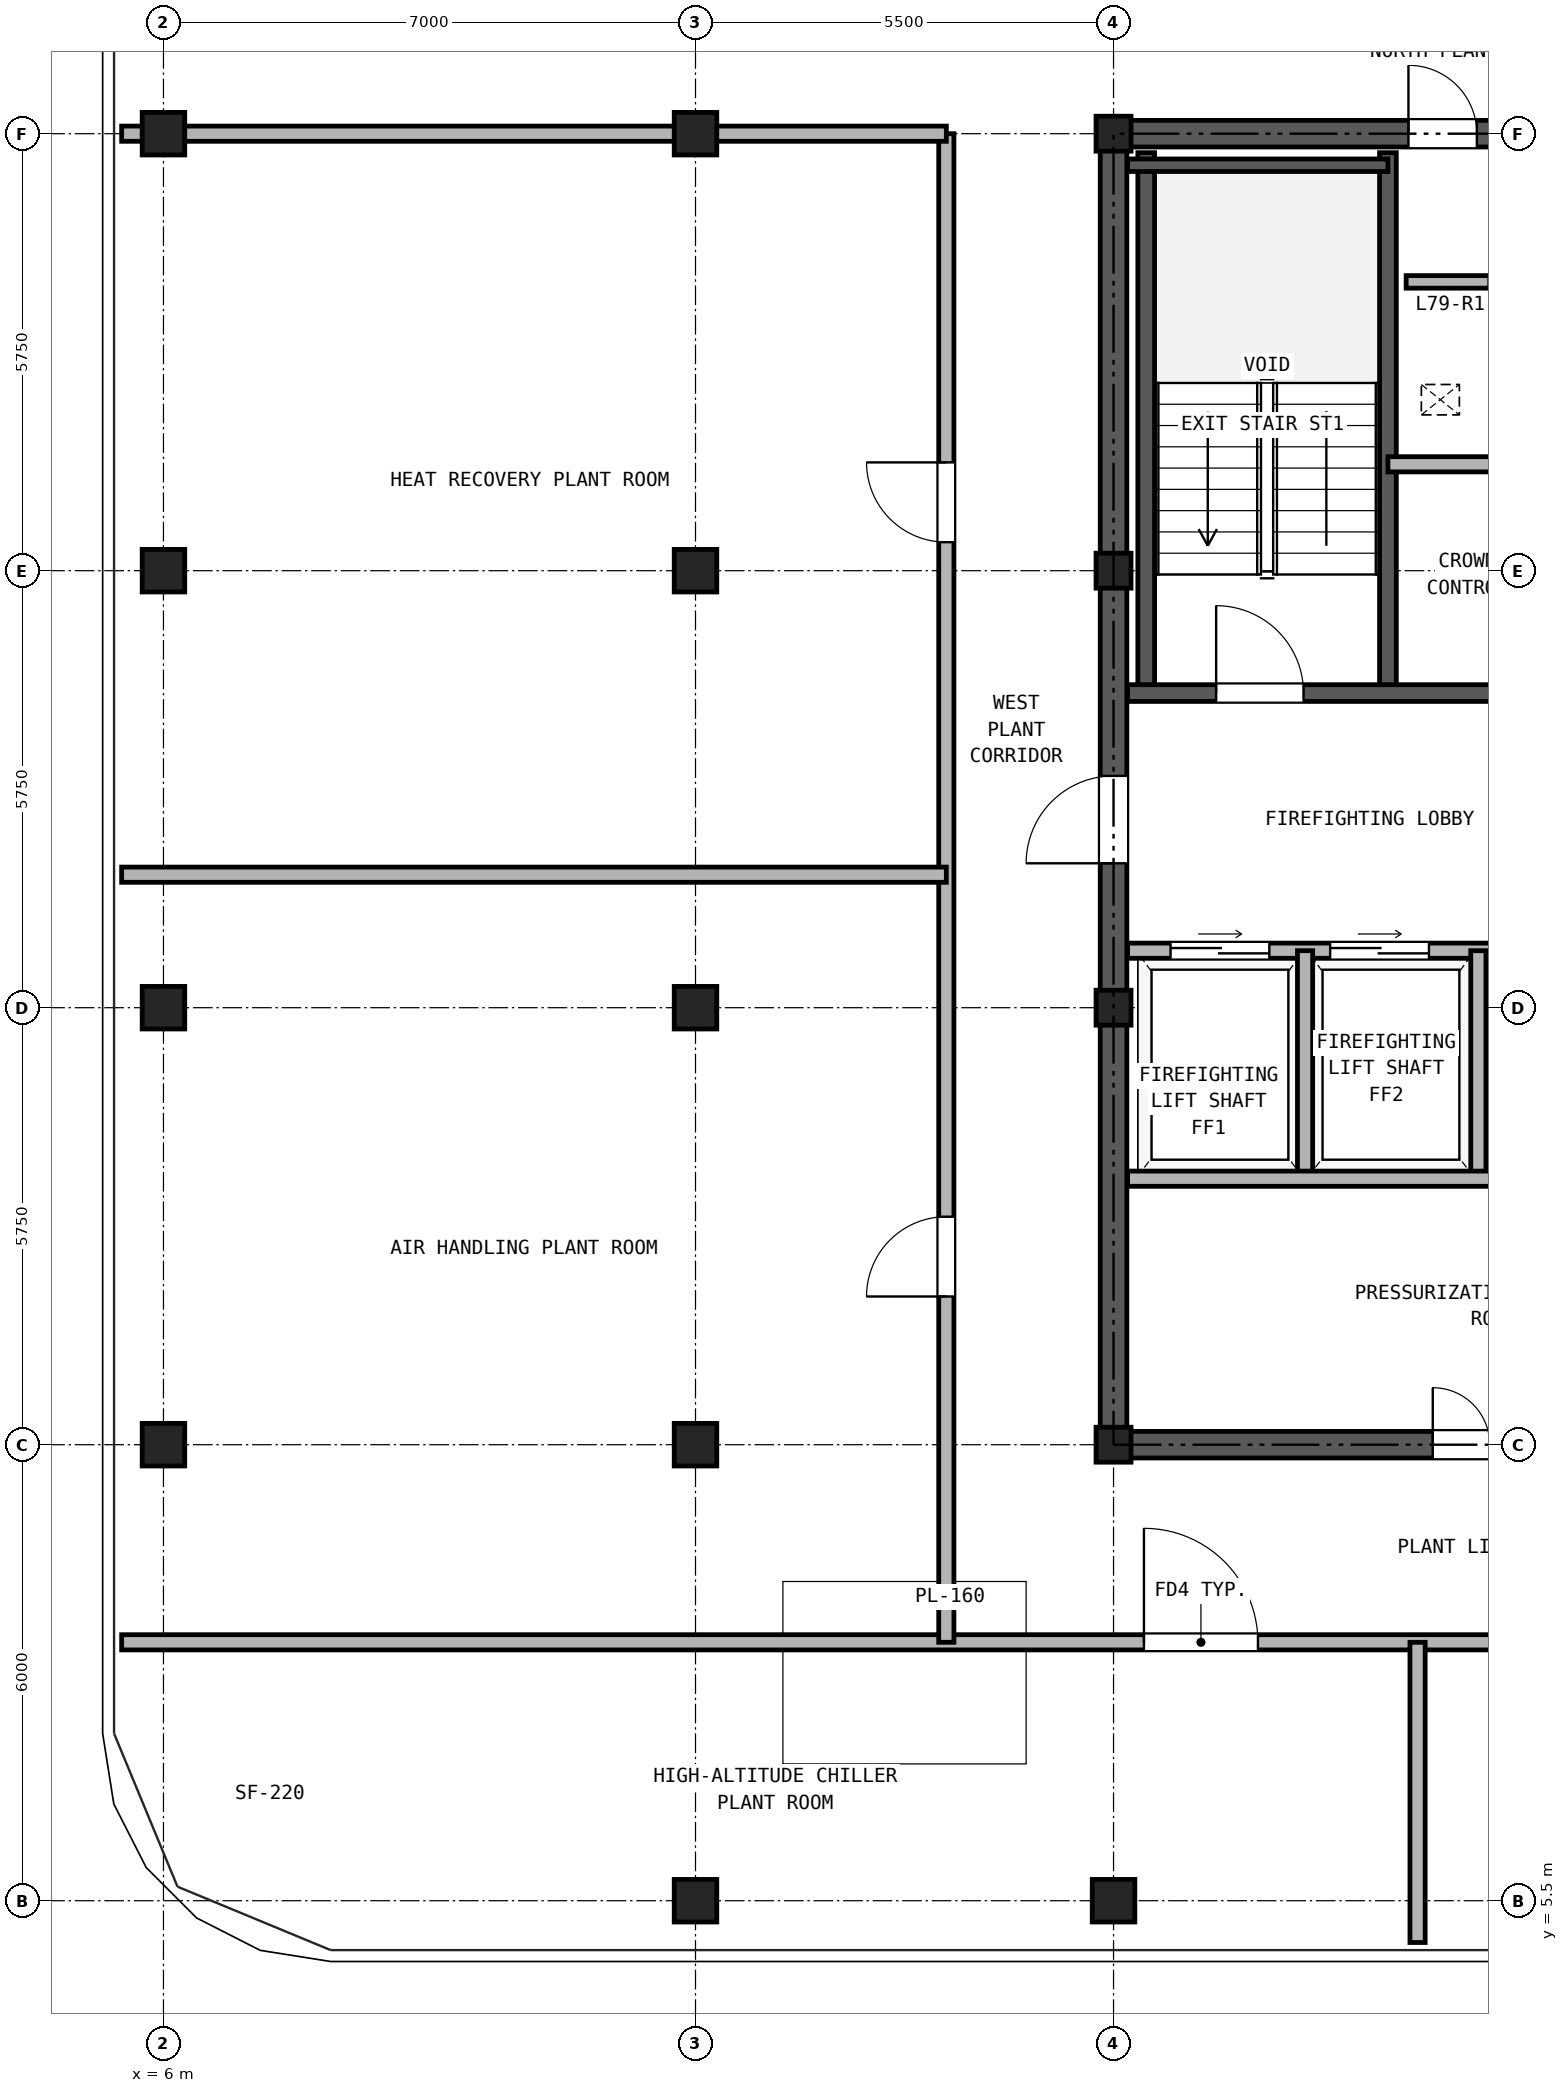
"""IFC4 building model, lengths in metres.
Left out: names, types, materials, properties, quantities, classifications, styles, units other than length and angle.
Written with IfcOpenShell. Run it as: python <this file> out.ifc"""

import sys

from ifc_helpers import new_model, si_unit, direction, frame, frame_2d, origin, origin_2d, place, context, subcontext, project, spatial, rectangle, hollow_rectangle, extrude, source, transform, mapped, element, fill, save


model = new_model("IFC4")
c1 = context("Model", 3, precision=1e-05, world=origin(), true_north=direction((0.0, 1.0)))
c2 = subcontext(c1, "Body", "Model", "MODEL_VIEW")
j1 = project(units=[si_unit("LENGTHUNIT", "METRE"), si_unit("PLANEANGLEUNIT", "RADIAN")], contexts=[c1])
p1 = place(None, origin())
s1 = spatial("IfcSite", under=j1, at=p1, CompositionType="ELEMENT")
p2 = place(p1, origin())
s2 = spatial("IfcBuilding", under=s1, at=p2, CompositionType="ELEMENT")
p3 = place(p2, frame((0.0, 0.0, 274.9)))
s3 = spatial("IfcBuildingStorey", under=s2, at=p3, CompositionType="ELEMENT", Elevation=274.9)
m1 = source(origin(), c2, "Body", "SweptSolid", [
    extrude(hollow_rectangle(XDim=0.56, YDim=0.56, WallThickness=0.03, at=origin_2d()), origin(), (0.0, 0.0, 1.0), 3.38),
])
for number, where, z_axis, x_axis in (
    (1, (13.0, 5.5, 0.0), (0.0, 0.0, 1.0), (1.0, 0.0, 0.0)),
    (2, (18.5, 5.5, 0.0), (0.0, 0.0, 1.0), (1.0, 0.0, 0.0)),
    (3, (6.0, 11.5, 0.0), (0.0, 0.0, 1.0), (1.0, 0.0, 0.0)),
    (4, (6.0, 17.25, 0.0), (0.0, 0.0, 1.0), (1.0, 0.0, 0.0)),
    (5, (6.0, 23.0, 0.0), (0.0, 0.0, 1.0), (1.0, 0.0, 0.0)),
    (6, (6.0, 28.75, 0.0), (0.0, 0.0, 1.0), (1.0, 0.0, 0.0)),
    (7, (13.0, 11.5, 0.0), (0.0, 0.0, 1.0), (1.0, 0.0, 0.0)),
    (8, (13.0, 17.25, 0.0), (0.0, 0.0, 1.0), (1.0, 0.0, 0.0)),
    (9, (13.0, 23.0, 0.0), (0.0, 0.0, 1.0), (1.0, 0.0, 0.0)),
    (10, (13.0, 28.75, 0.0), (0.0, 0.0, 1.0), (1.0, 0.0, 0.0)),
):
    element("IfcColumn", number, at=place(p3, frame(where, z_axis=z_axis, x_axis=x_axis)), inside=s3, PredefinedType="COLUMN", context=c2, shape_type="MappedRepresentation", body=[
        mapped(m1, transform((0.0, 0.0, 0.0), x_axis=(1.0, 0.0, 0.0), y_axis=(0.0, 1.0, 0.0), z_axis=(0.0, 0.0, 1.0), scale=1.0)),
    ])
m2 = source(origin(), c2, "Body", "SweptSolid", [
    extrude(hollow_rectangle(XDim=0.46, YDim=0.46, WallThickness=0.025, at=origin_2d()), origin(), (0.0, 0.0, 1.0), 3.38),
])
for number, where, z_axis, x_axis in (
    (11, (18.5, 11.5, 0.0), (0.0, 0.0, 1.0), (1.0, 0.0, 0.0)),
    (12, (18.5, 17.25, 0.0), (0.0, 0.0, 1.0), (1.0, 0.0, 0.0)),
    (13, (18.5, 23.0, 0.0), (0.0, 0.0, 1.0), (1.0, 0.0, 0.0)),
    (14, (18.5, 28.75, 0.0), (0.0, 0.0, 1.0), (1.0, 0.0, 0.0)),
):
    element("IfcColumn", number, at=place(p3, frame(where, z_axis=z_axis, x_axis=x_axis)), inside=s3, PredefinedType="COLUMN", context=c2, shape_type="MappedRepresentation", body=[
        mapped(m2, transform((0.0, 0.0, 0.0), x_axis=(1.0, 0.0, 0.0), y_axis=(0.0, 1.0, 0.0), z_axis=(0.0, 0.0, 1.0), scale=1.0)),
    ])
p4 = place(p3, frame((18.325, 11.5, 0.0), z_axis=(0.0, 0.0, 1.0), x_axis=(1.0, 0.0, 0.0)))
e15 = element("IfcWall", 15, at=p4, inside=s3, PredefinedType="SHEAR", context=c2, shape_type="SweptSolid", body=[
    extrude(rectangle(XDim=10.35, YDim=0.35, at=frame_2d((5.175, 0.0))), origin(), (0.0, 0.0, 1.0), 3.38),
])
p5 = place(p4, frame((4.375, 0.0, 0.0)))
e16 = element("IfcOpeningElement", 16, at=p5, cuts=e15, PredefinedType="OPENING", context=c2, shape_type="SweptSolid", body=[
    extrude(rectangle(XDim=1.5, YDim=2.25, at=frame_2d((0.75, 1.125))), frame((0.0, 0.185, 0.0), z_axis=(0.0, -1.0, 0.0), x_axis=(1.0, 0.0, 0.0)), (0.0, 0.0, 1.0), 0.37),
])
p6 = place(p3, frame((18.325, 28.75, 0.0), z_axis=(0.0, 0.0, 1.0), x_axis=(1.0, 0.0, 0.0)))
e17 = element("IfcWall", 17, at=p6, inside=s3, PredefinedType="SHEAR", context=c2, shape_type="SweptSolid", body=[
    extrude(rectangle(XDim=10.35, YDim=0.35, at=frame_2d((5.175, 0.0))), origin(), (0.0, 0.0, 1.0), 3.38),
])
p7 = place(p6, frame((4.055, 0.0, 0.0)))
e18 = element("IfcOpeningElement", 18, at=p7, cuts=e17, PredefinedType="OPENING", context=c2, shape_type="SweptSolid", body=[
    extrude(rectangle(XDim=0.9, YDim=2.05, at=frame_2d((0.45, 1.025))), frame((0.0, 0.185, 0.0), z_axis=(0.0, -1.0, 0.0), x_axis=(1.0, 0.0, 0.0)), (0.0, 0.0, 1.0), 0.37),
])
p8 = place(p6, frame((5.595, 0.0, 0.0)))
e19 = element("IfcOpeningElement", 19, at=p8, cuts=e17, PredefinedType="OPENING", context=c2, shape_type="SweptSolid", body=[
    extrude(rectangle(XDim=0.9, YDim=2.05, at=frame_2d((0.45, 1.025))), frame((0.0, 0.185, 0.0), z_axis=(0.0, -1.0, 0.0), x_axis=(1.0, 0.0, 0.0)), (0.0, 0.0, 1.0), 0.37),
])
p9 = place(p3, frame((18.5, 11.675, 0.0), z_axis=(0.0, 0.0, 1.0), x_axis=(0.0, 1.0, 0.0)))
e20 = element("IfcWall", 20, at=p9, inside=s3, PredefinedType="SHEAR", context=c2, shape_type="SweptSolid", body=[
    extrude(rectangle(XDim=16.9, YDim=0.35, at=frame_2d((8.45, 0.0))), origin(), (0.0, 0.0, 1.0), 3.38),
])
p10 = place(p9, frame((7.475, 0.0, 0.0)))
e21 = element("IfcOpeningElement", 21, at=p10, cuts=e20, PredefinedType="OPENING", context=c2, shape_type="SweptSolid", body=[
    extrude(rectangle(XDim=1.15, YDim=2.2, at=frame_2d((0.575, 1.1))), frame((0.0, 0.185, 0.0), z_axis=(0.0, -1.0, 0.0), x_axis=(1.0, 0.0, 0.0)), (0.0, 0.0, 1.0), 0.37),
])
for number, where, z_axis, x_axis in (
    (22, (18.93, 21.39, 0.0), (0.0, 0.0, 1.0), (0.0, 1.0, 0.0)),
    (23, (22.11, 21.39, 0.0), (0.0, 0.0, 1.0), (0.0, 1.0, 0.0)),
):
    element("IfcWall", number, at=place(p3, frame(where, z_axis=z_axis, x_axis=x_axis)), inside=s3, PredefinedType="SOLIDWALL", context=c2, shape_type="SweptSolid", body=[
        extrude(rectangle(XDim=7.11, YDim=0.22, at=frame_2d((3.555, 0.0))), origin(), (0.0, 0.0, 1.0), 3.38),
    ])
p11 = place(p3, frame((18.685, 28.335, 0.0), z_axis=(0.0, 0.0, 1.0), x_axis=(1.0, 0.0, 0.0)))
e24 = element("IfcWall", 24, at=p11, inside=s3, PredefinedType="PARTITIONING", context=c2, shape_type="SweptSolid", body=[
    extrude(rectangle(XDim=3.425, YDim=0.165, at=frame_2d((1.712, 0.0))), origin(), (0.0, 0.0, 1.0), 3.38),
])
p12 = place(p3, frame((18.685, 21.39, 0.0), z_axis=(0.0, 0.0, 1.0), x_axis=(1.0, 0.0, 0.0)))
e25 = element("IfcWall", 25, at=p12, inside=s3, PredefinedType="SOLIDWALL", context=c2, shape_type="SweptSolid", body=[
    extrude(rectangle(XDim=6.445, YDim=0.22, at=frame_2d((3.222, 0.0))), origin(), (0.0, 0.0, 1.0), 3.38),
])
p13 = place(p12, frame((1.165, 0.0, 0.0)))
e26 = element("IfcOpeningElement", 26, at=p13, cuts=e25, PredefinedType="OPENING", context=c2, shape_type="SweptSolid", body=[
    extrude(rectangle(XDim=1.15, YDim=2.2, at=frame_2d((0.575, 1.1))), frame((0.0, 0.12, 0.0), z_axis=(0.0, -1.0, 0.0), x_axis=(1.0, 0.0, 0.0)), (0.0, 0.0, 1.0), 0.24),
])
p14 = place(p12, frame((4.935, 0.0, 0.0)))
e27 = element("IfcOpeningElement", 27, at=p14, cuts=e25, PredefinedType="OPENING", context=c2, shape_type="SweptSolid", body=[
    extrude(rectangle(XDim=1.05, YDim=2.15, at=frame_2d((0.525, 1.075))), frame((0.0, 0.12, 0.0), z_axis=(0.0, -1.0, 0.0), x_axis=(1.0, 0.0, 0.0)), (0.0, 0.0, 1.0), 0.24),
])
p15 = place(p3, frame((22.11, 24.4, 0.0), z_axis=(0.0, 0.0, 1.0), x_axis=(1.0, 0.0, 0.0)))
e28 = element("IfcWall", 28, at=p15, inside=s3, PredefinedType="PARTITIONING", context=c2, shape_type="SweptSolid", body=[
    extrude(rectangle(XDim=3.02, YDim=0.2, at=frame_2d((1.51, 0.0))), origin(), (0.0, 0.0, 1.0), 3.38),
])
p16 = place(p3, frame((18.685, 18.0, 0.0), z_axis=(0.0, 0.0, 1.0), x_axis=(1.0, 0.0, 0.0)))
e29 = element("IfcWall", 29, at=p16, inside=s3, PredefinedType="PARTITIONING", context=c2, shape_type="SweptSolid", body=[
    extrude(rectangle(XDim=9.63, YDim=0.2, at=frame_2d((4.815, 0.0))), origin(), (0.0, 0.0, 1.0), 3.38),
])
p17 = place(p16, frame((0.565, 0.0, 0.0)))
e30 = element("IfcOpeningElement", 30, at=p17, cuts=e29, PredefinedType="OPENING", context=c2, shape_type="SweptSolid", body=[
    extrude(rectangle(XDim=1.3, YDim=2.3, at=frame_2d((0.65, 1.15))), frame((0.0, 0.11, 0.0), z_axis=(0.0, -1.0, 0.0), x_axis=(1.0, 0.0, 0.0)), (0.0, 0.0, 1.0), 0.22),
])
p18 = place(p16, frame((2.665, 0.0, 0.0)))
e31 = element("IfcOpeningElement", 31, at=p18, cuts=e29, PredefinedType="OPENING", context=c2, shape_type="SweptSolid", body=[
    extrude(rectangle(XDim=1.3, YDim=2.3, at=frame_2d((0.65, 1.15))), frame((0.0, 0.11, 0.0), z_axis=(0.0, -1.0, 0.0), x_axis=(1.0, 0.0, 0.0)), (0.0, 0.0, 1.0), 0.22),
])
p19 = place(p16, frame((5.085, 0.0, 0.0)))
e32 = element("IfcOpeningElement", 32, at=p19, cuts=e29, PredefinedType="OPENING", context=c2, shape_type="SweptSolid", body=[
    extrude(rectangle(XDim=0.9, YDim=2.05, at=frame_2d((0.45, 1.025))), frame((0.0, 0.11, 0.0), z_axis=(0.0, -1.0, 0.0), x_axis=(1.0, 0.0, 0.0)), (0.0, 0.0, 1.0), 0.22),
])
p20 = place(p16, frame((8.215, 0.0, 0.0)))
e33 = element("IfcOpeningElement", 33, at=p20, cuts=e29, PredefinedType="OPENING", context=c2, shape_type="SweptSolid", body=[
    extrude(rectangle(XDim=0.9, YDim=2.05, at=frame_2d((0.45, 1.025))), frame((0.0, 0.11, 0.0), z_axis=(0.0, -1.0, 0.0), x_axis=(1.0, 0.0, 0.0)), (0.0, 0.0, 1.0), 0.22),
])
for number, where, z_axis, x_axis in (
    (34, (21.02, 15.0, 0.0), (0.0, 0.0, 1.0), (0.0, 1.0, 0.0)),
    (35, (23.3, 15.0, 0.0), (0.0, 0.0, 1.0), (0.0, 1.0, 0.0)),
):
    element("IfcWall", number, at=place(p3, frame(where, z_axis=z_axis, x_axis=x_axis)), inside=s3, PredefinedType="PARTITIONING", context=c2, shape_type="SweptSolid", body=[
        extrude(rectangle(XDim=3.0, YDim=0.2, at=frame_2d((1.5, 0.0))), origin(), (0.0, 0.0, 1.0), 3.38),
    ])
p21 = place(p3, frame((18.685, 15.0, 0.0), z_axis=(0.0, 0.0, 1.0), x_axis=(1.0, 0.0, 0.0)))
e36 = element("IfcWall", 36, at=p21, inside=s3, PredefinedType="PARTITIONING", context=c2, shape_type="SweptSolid", body=[
    extrude(rectangle(XDim=9.63, YDim=0.2, at=frame_2d((4.815, 0.0))), origin(), (0.0, 0.0, 1.0), 3.38),
])
p22 = place(p3, frame((5.45, 8.9, 0.0), z_axis=(0.0, 0.0, 1.0), x_axis=(1.0, 0.0, 0.0)))
e37 = element("IfcWall", 37, at=p22, inside=s3, PredefinedType="PARTITIONING", context=c2, shape_type="SweptSolid", body=[
    extrude(rectangle(XDim=36.1, YDim=0.2, at=frame_2d((18.05, 0.0))), origin(), (0.0, 0.0, 1.0), 3.38),
])
p23 = place(p22, frame((13.45, 0.0, 0.0)))
e38 = element("IfcOpeningElement", 38, at=p23, cuts=e37, PredefinedType="OPENING", context=c2, shape_type="SweptSolid", body=[
    extrude(rectangle(XDim=1.5, YDim=2.25, at=frame_2d((0.75, 1.125))), frame((0.0, 0.11, 0.0), z_axis=(0.0, -1.0, 0.0), x_axis=(1.0, 0.0, 0.0)), (0.0, 0.0, 1.0), 0.22),
])
p24 = place(p22, frame((20.65, 0.0, 0.0)))
e39 = element("IfcOpeningElement", 39, at=p24, cuts=e37, PredefinedType="OPENING", context=c2, shape_type="SweptSolid", body=[
    extrude(rectangle(XDim=1.5, YDim=2.25, at=frame_2d((0.75, 1.125))), frame((0.0, 0.11, 0.0), z_axis=(0.0, -1.0, 0.0), x_axis=(1.0, 0.0, 0.0)), (0.0, 0.0, 1.0), 0.22),
])
p25 = place(p3, frame((16.3, 8.9, 0.0), z_axis=(0.0, 0.0, 1.0), x_axis=(0.0, 1.0, 0.0)))
e40 = element("IfcWall", 40, at=p25, inside=s3, PredefinedType="PARTITIONING", context=c2, shape_type="SweptSolid", body=[
    extrude(rectangle(XDim=19.85, YDim=0.2, at=frame_2d((9.925, 0.0))), origin(), (0.0, 0.0, 1.0), 3.38),
])
p26 = place(p25, frame((4.55, 0.0, 0.0)))
e41 = element("IfcOpeningElement", 41, at=p26, cuts=e40, PredefinedType="OPENING", context=c2, shape_type="SweptSolid", body=[
    extrude(rectangle(XDim=1.05, YDim=2.15, at=frame_2d((0.525, 1.075))), frame((0.0, 0.11, 0.0), z_axis=(0.0, -1.0, 0.0), x_axis=(1.0, 0.0, 0.0)), (0.0, 0.0, 1.0), 0.22),
])
p27 = place(p25, frame((14.475, 0.0, 0.0)))
e42 = element("IfcOpeningElement", 42, at=p27, cuts=e40, PredefinedType="OPENING", context=c2, shape_type="SweptSolid", body=[
    extrude(rectangle(XDim=1.05, YDim=2.15, at=frame_2d((0.525, 1.075))), frame((0.0, 0.11, 0.0), z_axis=(0.0, -1.0, 0.0), x_axis=(1.0, 0.0, 0.0)), (0.0, 0.0, 1.0), 0.22),
])
p28 = place(p3, frame((5.45, 28.75, 0.0), z_axis=(0.0, 0.0, 1.0), x_axis=(1.0, 0.0, 0.0)))
e43 = element("IfcWall", 43, at=p28, inside=s3, PredefinedType="PARTITIONING", context=c2, shape_type="SweptSolid", body=[
    extrude(rectangle(XDim=10.85, YDim=0.2, at=frame_2d((5.425, 0.0))), origin(), (0.0, 0.0, 1.0), 2.905),
])
p29 = place(p3, frame((22.5, 4.95, 0.0), z_axis=(0.0, 0.0, 1.0), x_axis=(0.0, 1.0, 0.0)))
e44 = element("IfcWall", 44, at=p29, inside=s3, PredefinedType="PARTITIONING", context=c2, shape_type="SweptSolid", body=[
    extrude(rectangle(XDim=3.95, YDim=0.2, at=frame_2d((1.975, 0.0))), origin(), (0.0, 0.0, 1.0), 3.38),
])
p30 = place(p3, frame((5.45, 19.0, 0.0), z_axis=(0.0, 0.0, 1.0), x_axis=(1.0, 0.0, 0.0)))
e45 = element("IfcWall", 45, at=p30, inside=s3, PredefinedType="PARTITIONING", context=c2, shape_type="SweptSolid", body=[
    extrude(rectangle(XDim=10.85, YDim=0.2, at=frame_2d((5.425, 0.0))), origin(), (0.0, 0.0, 1.0), 3.38),
])
p31 = place(p3, frame((22.35, 26.8, 0.0), z_axis=(0.0, 0.0, 1.0), x_axis=(1.0, 0.0, 0.0)))
e46 = element("IfcWall", 46, at=p31, inside=s3, PredefinedType="PARTITIONING", context=c2, shape_type="SweptSolid", body=[
    extrude(rectangle(XDim=1.1, YDim=0.165, at=frame_2d((0.55, 0.0))), origin(), (0.0, 0.0, 1.0), 3.38),
])
p32 = place(p13, frame((1.15, 0.0, 0.0), z_axis=(0.0, 0.0, 1.0), x_axis=(-1.0, 0.0, 0.0)))
e47 = element("IfcDoor", 47, at=p32, inside=s3, OperationType="SINGLE_SWING_LEFT", PredefinedType="DOOR", context=c2, shape_type="SweptSolid", body=[
    extrude(rectangle(XDim=1.15, YDim=2.2, at=frame_2d((0.575, 1.1))), frame((0.0, 0.025, 0.0), z_axis=(0.0, -1.0, 0.0), x_axis=(1.0, 0.0, 0.0)), (0.0, 0.0, 1.0), 0.05),
])
fill(e26, e47)
p33 = place(p17, origin())
e48 = element("IfcDoor", 48, at=p33, inside=s3, OperationType="DOUBLE_DOOR_SLIDING", PredefinedType="DOOR", context=c2, shape_type="SweptSolid", body=[
    extrude(rectangle(XDim=1.3, YDim=2.3, at=frame_2d((0.65, 1.15))), frame((0.0, 0.025, 0.0), z_axis=(0.0, -1.0, 0.0), x_axis=(1.0, 0.0, 0.0)), (0.0, 0.0, 1.0), 0.05),
])
fill(e30, e48)
p34 = place(p18, origin())
e49 = element("IfcDoor", 49, at=p34, inside=s3, OperationType="DOUBLE_DOOR_SLIDING", PredefinedType="DOOR", context=c2, shape_type="SweptSolid", body=[
    extrude(rectangle(XDim=1.3, YDim=2.3, at=frame_2d((0.65, 1.15))), frame((0.0, 0.025, 0.0), z_axis=(0.0, -1.0, 0.0), x_axis=(1.0, 0.0, 0.0)), (0.0, 0.0, 1.0), 0.05),
])
fill(e31, e49)
p35 = place(p10, frame((1.15, 0.0, 0.0), z_axis=(0.0, 0.0, 1.0), x_axis=(-1.0, 0.0, 0.0)))
e50 = element("IfcDoor", 50, at=p35, inside=s3, OperationType="SINGLE_SWING_LEFT", PredefinedType="DOOR", context=c2, shape_type="SweptSolid", body=[
    extrude(rectangle(XDim=1.15, YDim=2.2, at=frame_2d((0.575, 1.1))), frame((0.0, 0.025, 0.0), z_axis=(0.0, -1.0, 0.0), x_axis=(1.0, 0.0, 0.0)), (0.0, 0.0, 1.0), 0.05),
])
fill(e21, e50)
p36 = place(p7, origin())
e51 = element("IfcDoor", 51, at=p36, inside=s3, OperationType="SINGLE_SWING_LEFT", PredefinedType="DOOR", context=c2, shape_type="SweptSolid", body=[
    extrude(rectangle(XDim=0.9, YDim=2.05, at=frame_2d((0.45, 1.025))), frame((0.0, 0.025, 0.0), z_axis=(0.0, -1.0, 0.0), x_axis=(1.0, 0.0, 0.0)), (0.0, 0.0, 1.0), 0.05),
])
fill(e18, e51)
p37 = place(p5, frame((1.5, 0.0, 0.0), z_axis=(0.0, 0.0, 1.0), x_axis=(-1.0, 0.0, 0.0)))
e52 = element("IfcDoor", 52, at=p37, inside=s3, OperationType="DOUBLE_DOOR_SINGLE_SWING", PredefinedType="DOOR", context=c2, shape_type="SweptSolid", body=[
    extrude(rectangle(XDim=1.5, YDim=2.25, at=frame_2d((0.75, 1.125))), frame((0.0, 0.025, 0.0), z_axis=(0.0, -1.0, 0.0), x_axis=(1.0, 0.0, 0.0)), (0.0, 0.0, 1.0), 0.05),
])
fill(e16, e52)
p38 = place(p23, frame((1.5, 0.0, 0.0), z_axis=(0.0, 0.0, 1.0), x_axis=(-1.0, 0.0, 0.0)))
e53 = element("IfcDoor", 53, at=p38, inside=s3, OperationType="SINGLE_SWING_LEFT", PredefinedType="DOOR", context=c2, shape_type="SweptSolid", body=[
    extrude(rectangle(XDim=1.5, YDim=2.25, at=frame_2d((0.75, 1.125))), frame((0.0, 0.025, 0.0), z_axis=(0.0, -1.0, 0.0), x_axis=(1.0, 0.0, 0.0)), (0.0, 0.0, 1.0), 0.05),
])
fill(e38, e53)
p39 = place(p26, frame((1.05, 0.0, 0.0), z_axis=(0.0, 0.0, 1.0), x_axis=(-1.0, 0.0, 0.0)))
e54 = element("IfcDoor", 54, at=p39, inside=s3, OperationType="SINGLE_SWING_LEFT", PredefinedType="DOOR", context=c2, shape_type="SweptSolid", body=[
    extrude(rectangle(XDim=1.05, YDim=2.15, at=frame_2d((0.525, 1.075))), frame((0.0, 0.025, 0.0), z_axis=(0.0, -1.0, 0.0), x_axis=(1.0, 0.0, 0.0)), (0.0, 0.0, 1.0), 0.05),
])
fill(e41, e54)
p40 = place(p27, frame((1.05, 0.0, 0.0), z_axis=(0.0, 0.0, 1.0), x_axis=(-1.0, 0.0, 0.0)))
e55 = element("IfcDoor", 55, at=p40, inside=s3, OperationType="SINGLE_SWING_RIGHT", PredefinedType="DOOR", context=c2, shape_type="SweptSolid", body=[
    extrude(rectangle(XDim=1.05, YDim=2.15, at=frame_2d((0.525, 1.075))), frame((0.0, 0.025, 0.0), z_axis=(0.0, -1.0, 0.0), x_axis=(1.0, 0.0, 0.0)), (0.0, 0.0, 1.0), 0.05),
])
fill(e42, e55)
save(model, sys.argv[1])
